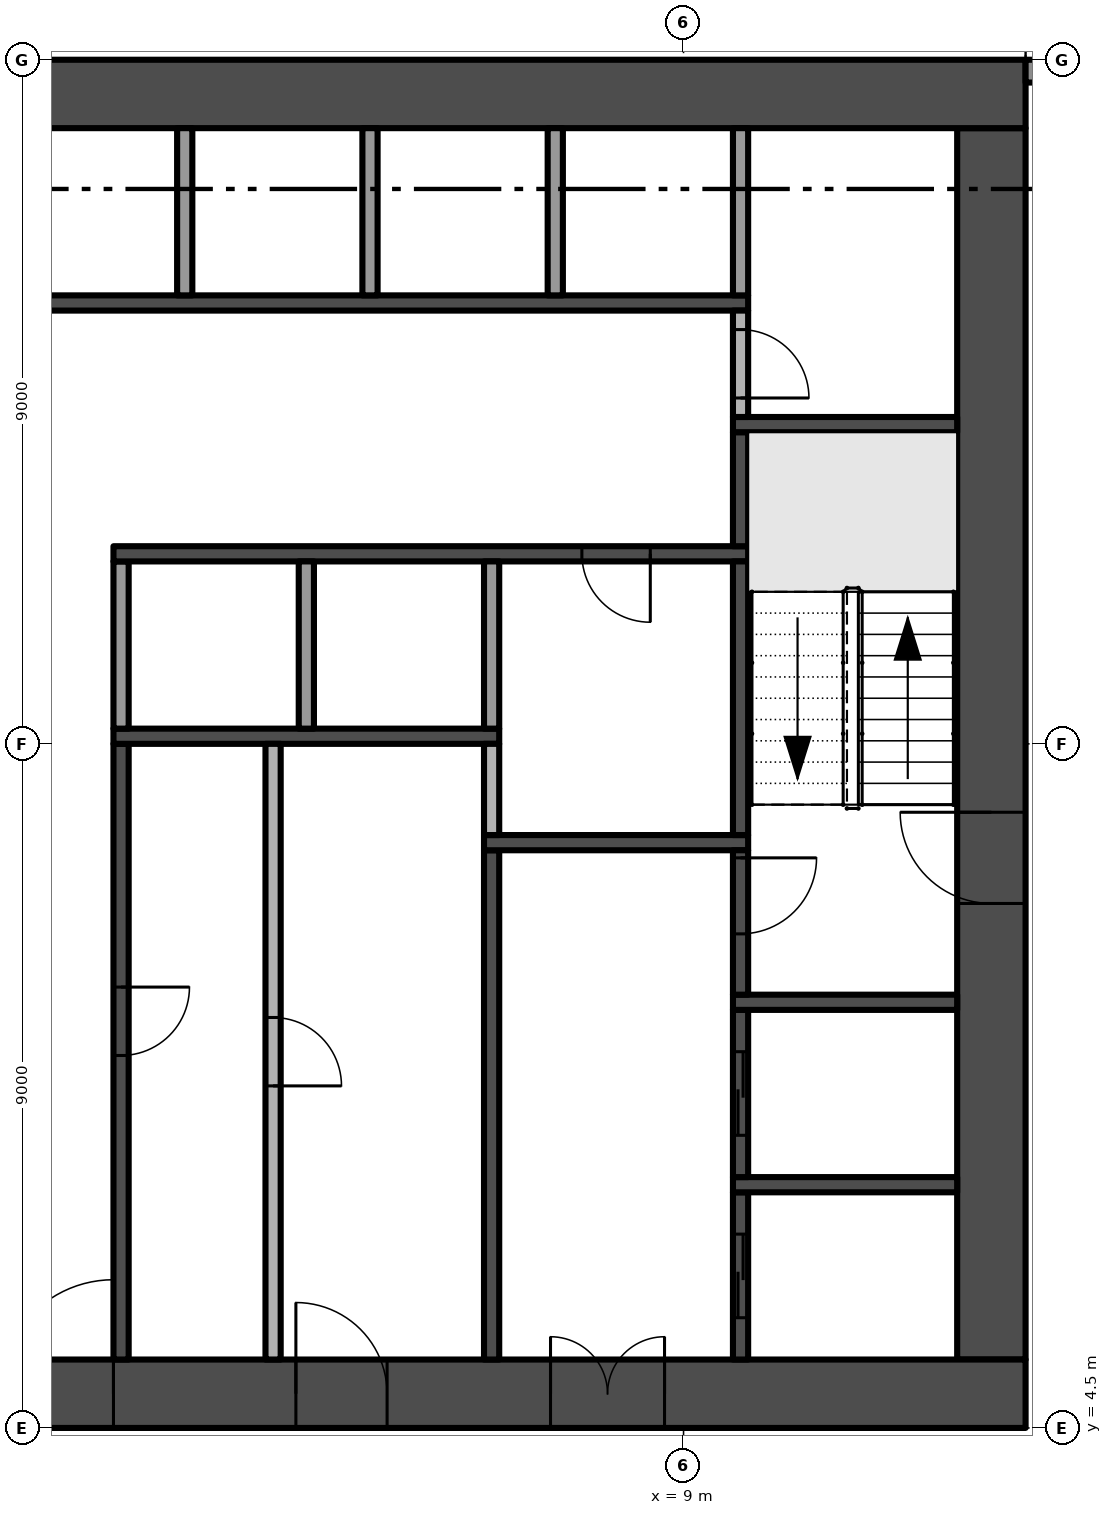
"""IFC4 building model, lengths in metres.
Left out: names, types, materials, properties, quantities, classifications, styles, units other than length and angle.
Written with IfcOpenShell. Run it as: python <this file> out.ifc"""

import sys

from ifc_helpers import new_model, si_unit, direction, frame, frame_2d, origin, place, context, subcontext, project, spatial, rectangle, extrude, element, fill, save


model = new_model("IFC4")
c1 = context("Model", 3, precision=1e-05, world=origin(), true_north=direction((0.0, 1.0)))
c2 = subcontext(c1, "Body", "Model", "MODEL_VIEW")
j1 = project(units=[si_unit("LENGTHUNIT", "METRE"), si_unit("PLANEANGLEUNIT", "RADIAN")], contexts=[c1])
p1 = place(None, origin())
s1 = spatial("IfcSite", under=j1, at=p1, CompositionType="ELEMENT")
p2 = place(p1, origin())
s2 = spatial("IfcBuilding", under=s1, at=p2, CompositionType="ELEMENT")
p3 = place(p2, frame((0.0, 0.0, 88.4)))
s3 = spatial("IfcBuildingStorey", under=s2, at=p3, CompositionType="ELEMENT", Elevation=88.4)
p4 = place(p3, frame((-13.5, 4.95, -0.3), z_axis=(0.0, 0.0, 1.0), x_axis=(1.0, 0.0, 0.0)))
e1 = element("IfcWall", 1, at=p4, inside=s3, PredefinedType="SHEAR", context=c2, shape_type="SweptSolid", body=[
    extrude(rectangle(XDim=27.0, YDim=0.9, at=frame_2d((13.5, 0.0))), origin(), (0.0, 0.0, 1.0), 3.8),
])
p5 = place(p4, frame((12.0, 0.0, 0.3)))
e2 = element("IfcOpeningElement", 2, at=p5, cuts=e1, PredefinedType="OPENING", context=c2, shape_type="SweptSolid", body=[
    extrude(rectangle(XDim=3.0, YDim=2.4, at=frame_2d((1.5, 1.2))), frame((0.0, 0.46, 0.0), z_axis=(0.0, -1.0, 0.0), x_axis=(1.0, 0.0, 0.0)), (0.0, 0.0, 1.0), 0.92),
])
p6 = place(p4, frame((4.9, 0.0, 0.3)))
e3 = element("IfcOpeningElement", 3, at=p6, cuts=e1, PredefinedType="OPENING", context=c2, shape_type="SweptSolid", body=[
    extrude(rectangle(XDim=1.2, YDim=2.2, at=frame_2d((0.6, 1.1))), frame((0.0, 0.46, 0.0), z_axis=(0.0, -1.0, 0.0), x_axis=(1.0, 0.0, 0.0)), (0.0, 0.0, 1.0), 0.92),
])
p7 = place(p4, frame((20.75, 0.0, 0.3)))
e4 = element("IfcOpeningElement", 4, at=p7, cuts=e1, PredefinedType="OPENING", context=c2, shape_type="SweptSolid", body=[
    extrude(rectangle(XDim=1.5, YDim=2.2, at=frame_2d((0.75, 1.1))), frame((0.0, 0.46, 0.0), z_axis=(0.0, -1.0, 0.0), x_axis=(1.0, 0.0, 0.0)), (0.0, 0.0, 1.0), 0.92),
])
p8 = place(p4, frame((17.4, 0.0, 0.3)))
e5 = element("IfcOpeningElement", 5, at=p8, cuts=e1, PredefinedType="OPENING", context=c2, shape_type="SweptSolid", body=[
    extrude(rectangle(XDim=1.2, YDim=2.2, at=frame_2d((0.6, 1.1))), frame((0.0, 0.46, 0.0), z_axis=(0.0, -1.0, 0.0), x_axis=(1.0, 0.0, 0.0)), (0.0, 0.0, 1.0), 0.92),
])
p9 = place(p3, frame((13.05, 5.4, -0.3), z_axis=(0.0, 0.0, 1.0), x_axis=(0.0, 1.0, 0.0)))
e6 = element("IfcWall", 6, at=p9, inside=s3, PredefinedType="SHEAR", context=c2, shape_type="SweptSolid", body=[
    extrude(rectangle(XDim=16.2, YDim=0.9, at=frame_2d((8.1, 0.0))), origin(), (0.0, 0.0, 1.0), 3.8),
])
p10 = place(p9, frame((6.0, 0.0, 0.3)))
e7 = element("IfcOpeningElement", 7, at=p10, cuts=e6, PredefinedType="OPENING", context=c2, shape_type="SweptSolid", body=[
    extrude(rectangle(XDim=1.2, YDim=2.2, at=frame_2d((0.6, 1.1))), frame((0.0, 0.46, 0.0), z_axis=(0.0, -1.0, 0.0), x_axis=(1.0, 0.0, 0.0)), (0.0, 0.0, 1.0), 0.92),
])
p11 = place(p3, frame((13.5, 22.05, -0.3), z_axis=(0.0, 0.0, 1.0), x_axis=(-1.0, 0.0, 0.0)))
e8 = element("IfcWall", 8, at=p11, inside=s3, PredefinedType="SHEAR", context=c2, shape_type="SweptSolid", body=[
    extrude(rectangle(XDim=27.0, YDim=0.9, at=frame_2d((13.5, 0.0))), origin(), (0.0, 0.0, 1.0), 3.8),
])
p12 = place(p3, frame((13.5, 22.35, 0.0), z_axis=(0.0, 0.0, 1.0), x_axis=(1.0, 0.0, 0.0)))
e9 = element("IfcWall", 9, at=p12, inside=s3, PredefinedType="SOLIDWALL", context=c2, shape_type="SweptSolid", body=[
    extrude(rectangle(XDim=3.85, YDim=0.3, at=frame_2d((1.925, 0.0))), origin(), (0.0, 0.0, 1.0), 3.5),
])
p13 = place(p12, frame((0.775, 0.0, 0.45)))
e10 = element("IfcOpeningElement", 10, at=p13, cuts=e9, PredefinedType="OPENING", context=c2, shape_type="SweptSolid", body=[
    extrude(rectangle(XDim=2.775, YDim=2.65, at=frame_2d((1.387, 1.325))), frame((0.0, 0.16, 0.0), z_axis=(0.0, -1.0, 0.0), x_axis=(1.0, 0.0, 0.0)), (0.0, 0.0, 1.0), 0.32),
])
p14 = place(p3, frame((-9.85, 19.3, 0.0), z_axis=(0.0, 0.0, 1.0), x_axis=(1.0, 0.0, 0.0)))
e11 = element("IfcWall", 11, at=p14, inside=s3, PredefinedType="SHEAR", context=c2, shape_type="SweptSolid", body=[
    extrude(rectangle(XDim=19.7, YDim=0.2, at=frame_2d((9.85, 0.0))), origin(), (0.0, 0.0, 1.0), 3.5),
])
p15 = place(p14, frame((0.769, 0.0, 0.0)))
e12 = element("IfcOpeningElement", 12, at=p15, cuts=e11, PredefinedType="OPENING", context=c2, shape_type="SweptSolid", body=[
    extrude(rectangle(XDim=1.1, YDim=2.1, at=frame_2d((0.55, 1.05))), frame((0.0, 0.11, 0.0), z_axis=(0.0, -1.0, 0.0), x_axis=(1.0, 0.0, 0.0)), (0.0, 0.0, 1.0), 0.22),
])
p16 = place(p14, frame((3.206, 0.0, 0.0)))
e13 = element("IfcOpeningElement", 13, at=p16, cuts=e11, PredefinedType="OPENING", context=c2, shape_type="SweptSolid", body=[
    extrude(rectangle(XDim=1.1, YDim=2.1, at=frame_2d((0.55, 1.05))), frame((0.0, 0.11, 0.0), z_axis=(0.0, -1.0, 0.0), x_axis=(1.0, 0.0, 0.0)), (0.0, 0.0, 1.0), 0.22),
])
p17 = place(p14, frame((5.644, 0.0, 0.0)))
e14 = element("IfcOpeningElement", 14, at=p17, cuts=e11, PredefinedType="OPENING", context=c2, shape_type="SweptSolid", body=[
    extrude(rectangle(XDim=1.1, YDim=2.1, at=frame_2d((0.55, 1.05))), frame((0.0, 0.11, 0.0), z_axis=(0.0, -1.0, 0.0), x_axis=(1.0, 0.0, 0.0)), (0.0, 0.0, 1.0), 0.22),
])
p18 = place(p14, frame((8.081, 0.0, 0.0)))
e15 = element("IfcOpeningElement", 15, at=p18, cuts=e11, PredefinedType="OPENING", context=c2, shape_type="SweptSolid", body=[
    extrude(rectangle(XDim=1.1, YDim=2.1, at=frame_2d((0.55, 1.05))), frame((0.0, 0.11, 0.0), z_axis=(0.0, -1.0, 0.0), x_axis=(1.0, 0.0, 0.0)), (0.0, 0.0, 1.0), 0.22),
])
p19 = place(p3, frame((1.6, 13.5, 0.0), z_axis=(0.0, 0.0, 1.0), x_axis=(0.0, -1.0, 0.0)))
e16 = element("IfcWall", 16, at=p19, inside=s3, PredefinedType="SHEAR", context=c2, shape_type="SweptSolid", body=[
    extrude(rectangle(XDim=8.1, YDim=0.2, at=frame_2d((4.05, 0.0))), origin(), (0.0, 0.0, 1.0), 3.5),
])
p20 = place(p19, frame((3.2, 0.0, 0.0)))
e17 = element("IfcOpeningElement", 17, at=p20, cuts=e16, PredefinedType="OPENING", context=c2, shape_type="SweptSolid", body=[
    extrude(rectangle(XDim=0.9, YDim=2.1, at=frame_2d((0.45, 1.05))), frame((0.0, 0.11, 0.0), z_axis=(0.0, -1.0, 0.0), x_axis=(1.0, 0.0, 0.0)), (0.0, 0.0, 1.0), 0.22),
])
p21 = place(p3, frame((1.5, 13.6, 0.0), z_axis=(0.0, 0.0, 1.0), x_axis=(1.0, 0.0, 0.0)))
e18 = element("IfcWall", 18, at=p21, inside=s3, PredefinedType="SHEAR", context=c2, shape_type="SweptSolid", body=[
    extrude(rectangle(XDim=5.075, YDim=0.2, at=frame_2d((2.538, 0.0))), origin(), (0.0, 0.0, 1.0), 3.5),
])
p22 = place(p3, frame((1.6, 13.7, 0.0), z_axis=(0.0, 0.0, 1.0), x_axis=(0.0, 1.0, 0.0)))
e19 = element("IfcWall", 19, at=p22, inside=s3, PredefinedType="PARTITIONING", context=c2, shape_type="SweptSolid", body=[
    extrude(rectangle(XDim=2.2, YDim=0.2, at=frame_2d((1.1, 0.0))), origin(), (0.0, 0.0, 1.0), 3.5),
])
p23 = place(p3, frame((9.85, 16.0, 0.0), z_axis=(0.0, 0.0, 1.0), x_axis=(-1.0, 0.0, 0.0)))
e20 = element("IfcWall", 20, at=p23, inside=s3, PredefinedType="SHEAR", context=c2, shape_type="SweptSolid", body=[
    extrude(rectangle(XDim=8.35, YDim=0.2, at=frame_2d((4.175, 0.0))), origin(), (0.0, 0.0, 1.0), 3.5),
])
p24 = place(p23, frame((1.288, 0.0, 0.0)))
e21 = element("IfcOpeningElement", 21, at=p24, cuts=e20, PredefinedType="OPENING", context=c2, shape_type="SweptSolid", body=[
    extrude(rectangle(XDim=0.9, YDim=2.1, at=frame_2d((0.45, 1.05))), frame((0.0, 0.11, 0.0), z_axis=(0.0, -1.0, 0.0), x_axis=(1.0, 0.0, 0.0)), (0.0, 0.0, 1.0), 0.22),
])
p25 = place(p3, frame((2.438, 19.4, 0.0), z_axis=(0.0, 0.0, 1.0), x_axis=(0.0, 1.0, 0.0)))
e22 = element("IfcWall", 22, at=p25, inside=s3, PredefinedType="PARTITIONING", context=c2, shape_type="SweptSolid", body=[
    extrude(rectangle(XDim=2.2, YDim=0.2, at=frame_2d((1.1, 0.0))), origin(), (0.0, 0.0, 1.0), 3.5),
])
p26 = place(p3, frame((3.6, 13.5, 0.0), z_axis=(0.0, 0.0, 1.0), x_axis=(0.0, -1.0, 0.0)))
e23 = element("IfcWall", 23, at=p26, inside=s3, PredefinedType="PARTITIONING", context=c2, shape_type="SweptSolid", body=[
    extrude(rectangle(XDim=8.1, YDim=0.2, at=frame_2d((4.05, 0.0))), origin(), (0.0, 0.0, 1.0), 3.5),
])
p27 = place(p26, frame((3.6, 0.0, 0.0)))
e24 = element("IfcOpeningElement", 24, at=p27, cuts=e23, PredefinedType="OPENING", context=c2, shape_type="SweptSolid", body=[
    extrude(rectangle(XDim=0.9, YDim=2.1, at=frame_2d((0.45, 1.05))), frame((0.0, 0.11, 0.0), z_axis=(0.0, -1.0, 0.0), x_axis=(1.0, 0.0, 0.0)), (0.0, 0.0, 1.0), 0.22),
])
for number, where, z_axis, x_axis in (
    (25, (4.037, 13.7, 0.0), (0.0, 0.0, 1.0), (0.0, 1.0, 0.0)),
    (26, (4.875, 19.4, 0.0), (0.0, 0.0, 1.0), (0.0, 1.0, 0.0)),
):
    element("IfcWall", number, at=place(p3, frame(where, z_axis=z_axis, x_axis=x_axis)), inside=s3, PredefinedType="PARTITIONING", context=c2, shape_type="SweptSolid", body=[
        extrude(rectangle(XDim=2.2, YDim=0.2, at=frame_2d((1.1, 0.0))), origin(), (0.0, 0.0, 1.0), 3.5),
    ])
p28 = place(p3, frame((6.475, 5.4, 0.0), z_axis=(0.0, 0.0, 1.0), x_axis=(0.0, 1.0, 0.0)))
e27 = element("IfcWall", 27, at=p28, inside=s3, PredefinedType="SHEAR", context=c2, shape_type="SweptSolid", body=[
    extrude(rectangle(XDim=6.7, YDim=0.2, at=frame_2d((3.35, 0.0))), origin(), (0.0, 0.0, 1.0), 3.5),
])
p29 = place(p3, frame((6.375, 12.2, 0.0), z_axis=(0.0, 0.0, 1.0), x_axis=(1.0, 0.0, 0.0)))
e28 = element("IfcWall", 28, at=p29, inside=s3, PredefinedType="SHEAR", context=c2, shape_type="SweptSolid", body=[
    extrude(rectangle(XDim=3.475, YDim=0.2, at=frame_2d((1.738, 0.0))), origin(), (0.0, 0.0, 1.0), 3.5),
])
p30 = place(p3, frame((6.475, 12.3, 0.0), z_axis=(0.0, 0.0, 1.0), x_axis=(0.0, 1.0, 0.0)))
e29 = element("IfcWall", 29, at=p30, inside=s3, PredefinedType="PARTITIONING", context=c2, shape_type="SweptSolid", body=[
    extrude(rectangle(XDim=1.2, YDim=0.2, at=frame_2d((0.6, 0.0))), origin(), (0.0, 0.0, 1.0), 3.5),
])
for number, where, z_axis, x_axis in (
    (30, (6.475, 13.7, 0.0), (0.0, 0.0, 1.0), (0.0, 1.0, 0.0)),
    (31, (7.312, 19.4, 0.0), (0.0, 0.0, 1.0), (0.0, 1.0, 0.0)),
):
    element("IfcWall", number, at=place(p3, frame(where, z_axis=z_axis, x_axis=x_axis)), inside=s3, PredefinedType="PARTITIONING", context=c2, shape_type="SweptSolid", body=[
        extrude(rectangle(XDim=2.2, YDim=0.2, at=frame_2d((1.1, 0.0))), origin(), (0.0, 0.0, 1.0), 3.5),
    ])
p31 = place(p3, frame((9.75, 5.4, 0.0), z_axis=(0.0, 0.0, 1.0), x_axis=(0.0, 1.0, 0.0)))
e32 = element("IfcWall", 32, at=p31, inside=s3, PredefinedType="SHEAR", context=c2, shape_type="SweptSolid", body=[
    extrude(rectangle(XDim=2.2, YDim=0.2, at=frame_2d((1.1, 0.0))), origin(), (0.0, 0.0, 1.0), 3.5),
])
p32 = place(p31, frame((0.55, 0.0, 0.0)))
e33 = element("IfcOpeningElement", 33, at=p32, cuts=e32, PredefinedType="OPENING", context=c2, shape_type="SweptSolid", body=[
    extrude(rectangle(XDim=1.1, YDim=2.1, at=frame_2d((0.55, 1.05))), frame((0.0, 0.11, 0.0), z_axis=(0.0, -1.0, 0.0), x_axis=(1.0, 0.0, 0.0)), (0.0, 0.0, 1.0), 0.22),
])
p33 = place(p3, frame((9.65, 7.7, 0.0), z_axis=(0.0, 0.0, 1.0), x_axis=(1.0, 0.0, 0.0)))
e34 = element("IfcWall", 34, at=p33, inside=s3, PredefinedType="SHEAR", context=c2, shape_type="SweptSolid", body=[
    extrude(rectangle(XDim=2.95, YDim=0.2, at=frame_2d((1.475, 0.0))), origin(), (0.0, 0.0, 1.0), 3.5),
])
p34 = place(p3, frame((9.75, 7.8, 0.0), z_axis=(0.0, 0.0, 1.0), x_axis=(0.0, 1.0, 0.0)))
e35 = element("IfcWall", 35, at=p34, inside=s3, PredefinedType="SHEAR", context=c2, shape_type="SweptSolid", body=[
    extrude(rectangle(XDim=2.2, YDim=0.2, at=frame_2d((1.1, 0.0))), origin(), (0.0, 0.0, 1.0), 3.5),
])
p35 = place(p34, frame((0.55, 0.0, 0.0)))
e36 = element("IfcOpeningElement", 36, at=p35, cuts=e35, PredefinedType="OPENING", context=c2, shape_type="SweptSolid", body=[
    extrude(rectangle(XDim=1.1, YDim=2.1, at=frame_2d((0.55, 1.05))), frame((0.0, 0.11, 0.0), z_axis=(0.0, -1.0, 0.0), x_axis=(1.0, 0.0, 0.0)), (0.0, 0.0, 1.0), 0.22),
])
p36 = place(p3, frame((9.65, 10.1, 0.0), z_axis=(0.0, 0.0, 1.0), x_axis=(1.0, 0.0, 0.0)))
e37 = element("IfcWall", 37, at=p36, inside=s3, PredefinedType="SHEAR", context=c2, shape_type="SweptSolid", body=[
    extrude(rectangle(XDim=2.95, YDim=0.2, at=frame_2d((1.475, 0.0))), origin(), (0.0, 0.0, 1.0), 3.5),
])
p37 = place(p3, frame((9.75, 12.1, 0.0), z_axis=(0.0, 0.0, 1.0), x_axis=(0.0, -1.0, 0.0)))
e38 = element("IfcWall", 38, at=p37, inside=s3, PredefinedType="SHEAR", context=c2, shape_type="SweptSolid", body=[
    extrude(rectangle(XDim=1.9, YDim=0.2, at=frame_2d((0.95, 0.0))), origin(), (0.0, 0.0, 1.0), 3.5),
])
p38 = place(p37, frame((0.1, 0.0, 0.0)))
e39 = element("IfcOpeningElement", 39, at=p38, cuts=e38, PredefinedType="OPENING", context=c2, shape_type="SweptSolid", body=[
    extrude(rectangle(XDim=1.0, YDim=2.2, at=frame_2d((0.5, 1.1))), frame((0.0, 0.11, 0.0), z_axis=(0.0, -1.0, 0.0), x_axis=(1.0, 0.0, 0.0)), (0.0, 0.0, 1.0), 0.22),
])
p39 = place(p3, frame((9.75, 12.3, 0.0), z_axis=(0.0, 0.0, 1.0), x_axis=(0.0, 1.0, 0.0)))
e40 = element("IfcWall", 40, at=p39, inside=s3, PredefinedType="SHEAR", context=c2, shape_type="SweptSolid", body=[
    extrude(rectangle(XDim=3.6, YDim=0.2, at=frame_2d((1.8, 0.0))), origin(), (0.0, 0.0, 1.0), 3.5),
])
p40 = place(p3, frame((9.75, 16.1, 0.0), z_axis=(0.0, 0.0, 1.0), x_axis=(0.0, 1.0, 0.0)))
e41 = element("IfcWall", 41, at=p40, inside=s3, PredefinedType="SHEAR", context=c2, shape_type="SweptSolid", body=[
    extrude(rectangle(XDim=1.5, YDim=0.2, at=frame_2d((0.75, 0.0))), origin(), (0.0, 0.0, 1.0), 3.5),
])
p41 = place(p3, frame((9.65, 17.7, 0.0), z_axis=(0.0, 0.0, 1.0), x_axis=(1.0, 0.0, 0.0)))
e42 = element("IfcWall", 42, at=p41, inside=s3, PredefinedType="SHEAR", context=c2, shape_type="SweptSolid", body=[
    extrude(rectangle(XDim=2.95, YDim=0.2, at=frame_2d((1.475, 0.0))), origin(), (0.0, 0.0, 1.0), 3.5),
])
p42 = place(p3, frame((9.75, 19.2, 0.0), z_axis=(0.0, 0.0, 1.0), x_axis=(0.0, -1.0, 0.0)))
e43 = element("IfcWall", 43, at=p42, inside=s3, PredefinedType="PARTITIONING", context=c2, shape_type="SweptSolid", body=[
    extrude(rectangle(XDim=1.4, YDim=0.2, at=frame_2d((0.7, 0.0))), origin(), (0.0, 0.0, 1.0), 3.5),
])
p43 = place(p42, frame((0.25, 0.0, 0.0)))
e44 = element("IfcOpeningElement", 44, at=p43, cuts=e43, PredefinedType="OPENING", context=c2, shape_type="SweptSolid", body=[
    extrude(rectangle(XDim=0.9, YDim=2.1, at=frame_2d((0.45, 1.05))), frame((0.0, 0.11, 0.0), z_axis=(0.0, -1.0, 0.0), x_axis=(1.0, 0.0, 0.0)), (0.0, 0.0, 1.0), 0.22),
])
p44 = place(p3, frame((9.75, 19.4, 0.0), z_axis=(0.0, 0.0, 1.0), x_axis=(0.0, 1.0, 0.0)))
e45 = element("IfcWall", 45, at=p44, inside=s3, PredefinedType="PARTITIONING", context=c2, shape_type="SweptSolid", body=[
    extrude(rectangle(XDim=2.2, YDim=0.2, at=frame_2d((1.1, 0.0))), origin(), (0.0, 0.0, 1.0), 3.5),
])
p45 = place(p5, frame((3.0, 0.0, 0.0), z_axis=(0.0, 0.0, 1.0), x_axis=(-1.0, 0.0, 0.0)))
e46 = element("IfcDoor", 46, at=p45, inside=s3, OperationType="DOUBLE_DOOR_SINGLE_SWING", PredefinedType="DOOR", context=c2, shape_type="SweptSolid", body=[
    extrude(rectangle(XDim=3.0, YDim=2.4, at=frame_2d((1.5, 1.2))), frame((0.0, 0.025, 0.0), z_axis=(0.0, -1.0, 0.0), x_axis=(1.0, 0.0, 0.0)), (0.0, 0.0, 1.0), 0.05),
])
fill(e2, e46)
p46 = place(p10, frame((1.2, 0.0, 0.0), z_axis=(0.0, 0.0, 1.0), x_axis=(-1.0, 0.0, 0.0)))
e47 = element("IfcDoor", 47, at=p46, inside=s3, OperationType="SINGLE_SWING_LEFT", PredefinedType="DOOR", context=c2, shape_type="SweptSolid", body=[
    extrude(rectangle(XDim=1.2, YDim=2.2, at=frame_2d((0.6, 1.1))), frame((0.0, 0.025, 0.0), z_axis=(0.0, -1.0, 0.0), x_axis=(1.0, 0.0, 0.0)), (0.0, 0.0, 1.0), 0.05),
])
fill(e7, e47)
p47 = place(p7, frame((1.5, 0.0, 0.0), z_axis=(0.0, 0.0, 1.0), x_axis=(-1.0, 0.0, 0.0)))
e48 = element("IfcDoor", 48, at=p47, inside=s3, OperationType="DOUBLE_DOOR_SINGLE_SWING", PredefinedType="DOOR", context=c2, shape_type="SweptSolid", body=[
    extrude(rectangle(XDim=1.5, YDim=2.2, at=frame_2d((0.75, 1.1))), frame((0.0, 0.025, 0.0), z_axis=(0.0, -1.0, 0.0), x_axis=(1.0, 0.0, 0.0)), (0.0, 0.0, 1.0), 0.05),
])
fill(e4, e48)
p48 = place(p8, frame((1.2, 0.0, 0.0), z_axis=(0.0, 0.0, 1.0), x_axis=(-1.0, 0.0, 0.0)))
e49 = element("IfcDoor", 49, at=p48, inside=s3, OperationType="SINGLE_SWING_RIGHT", PredefinedType="DOOR", context=c2, shape_type="SweptSolid", body=[
    extrude(rectangle(XDim=1.2, YDim=2.2, at=frame_2d((0.6, 1.1))), frame((0.0, 0.025, 0.0), z_axis=(0.0, -1.0, 0.0), x_axis=(1.0, 0.0, 0.0)), (0.0, 0.0, 1.0), 0.05),
])
fill(e5, e49)
p49 = place(p38, origin())
e50 = element("IfcDoor", 50, at=p49, inside=s3, OperationType="SINGLE_SWING_LEFT", PredefinedType="DOOR", context=c2, shape_type="SweptSolid", body=[
    extrude(rectangle(XDim=1.0, YDim=2.2, at=frame_2d((0.5, 1.1))), frame((0.0, 0.025, 0.0), z_axis=(0.0, -1.0, 0.0), x_axis=(1.0, 0.0, 0.0)), (0.0, 0.0, 1.0), 0.05),
])
fill(e39, e50)
p50 = place(p32, origin())
e51 = element("IfcDoor", 51, at=p50, inside=s3, OperationType="SLIDING_TO_RIGHT", PredefinedType="DOOR", context=c2, shape_type="SweptSolid", body=[
    extrude(rectangle(XDim=1.1, YDim=2.1, at=frame_2d((0.55, 1.05))), frame((0.0, 0.025, 0.0), z_axis=(0.0, -1.0, 0.0), x_axis=(1.0, 0.0, 0.0)), (0.0, 0.0, 1.0), 0.05),
])
fill(e33, e51)
p51 = place(p35, origin())
e52 = element("IfcDoor", 52, at=p51, inside=s3, OperationType="SLIDING_TO_RIGHT", PredefinedType="DOOR", context=c2, shape_type="SweptSolid", body=[
    extrude(rectangle(XDim=1.1, YDim=2.1, at=frame_2d((0.55, 1.05))), frame((0.0, 0.025, 0.0), z_axis=(0.0, -1.0, 0.0), x_axis=(1.0, 0.0, 0.0)), (0.0, 0.0, 1.0), 0.05),
])
fill(e36, e52)
p52 = place(p20, origin())
e53 = element("IfcDoor", 53, at=p52, inside=s3, OperationType="SINGLE_SWING_LEFT", PredefinedType="DOOR", context=c2, shape_type="SweptSolid", body=[
    extrude(rectangle(XDim=0.9, YDim=2.1, at=frame_2d((0.45, 1.05))), frame((0.0, 0.025, 0.0), z_axis=(0.0, -1.0, 0.0), x_axis=(1.0, 0.0, 0.0)), (0.0, 0.0, 1.0), 0.05),
])
fill(e17, e53)
p53 = place(p24, origin())
e54 = element("IfcDoor", 54, at=p53, inside=s3, OperationType="SINGLE_SWING_LEFT", PredefinedType="DOOR", context=c2, shape_type="SweptSolid", body=[
    extrude(rectangle(XDim=0.9, YDim=2.1, at=frame_2d((0.45, 1.05))), frame((0.0, 0.025, 0.0), z_axis=(0.0, -1.0, 0.0), x_axis=(1.0, 0.0, 0.0)), (0.0, 0.0, 1.0), 0.05),
])
fill(e21, e54)
p54 = place(p43, origin())
e55 = element("IfcDoor", 55, at=p54, inside=s3, OperationType="SINGLE_SWING_RIGHT", PredefinedType="DOOR", context=c2, shape_type="SweptSolid", body=[
    extrude(rectangle(XDim=0.9, YDim=2.1, at=frame_2d((0.45, 1.05))), frame((0.0, 0.025, 0.0), z_axis=(0.0, -1.0, 0.0), x_axis=(1.0, 0.0, 0.0)), (0.0, 0.0, 1.0), 0.05),
])
fill(e44, e55)
p55 = place(p27, origin())
e56 = element("IfcDoor", 56, at=p55, inside=s3, OperationType="SINGLE_SWING_RIGHT", PredefinedType="DOOR", context=c2, shape_type="SweptSolid", body=[
    extrude(rectangle(XDim=0.9, YDim=2.1, at=frame_2d((0.45, 1.05))), frame((0.0, 0.025, 0.0), z_axis=(0.0, -1.0, 0.0), x_axis=(1.0, 0.0, 0.0)), (0.0, 0.0, 1.0), 0.05),
])
fill(e24, e56)
save(model, sys.argv[1])
